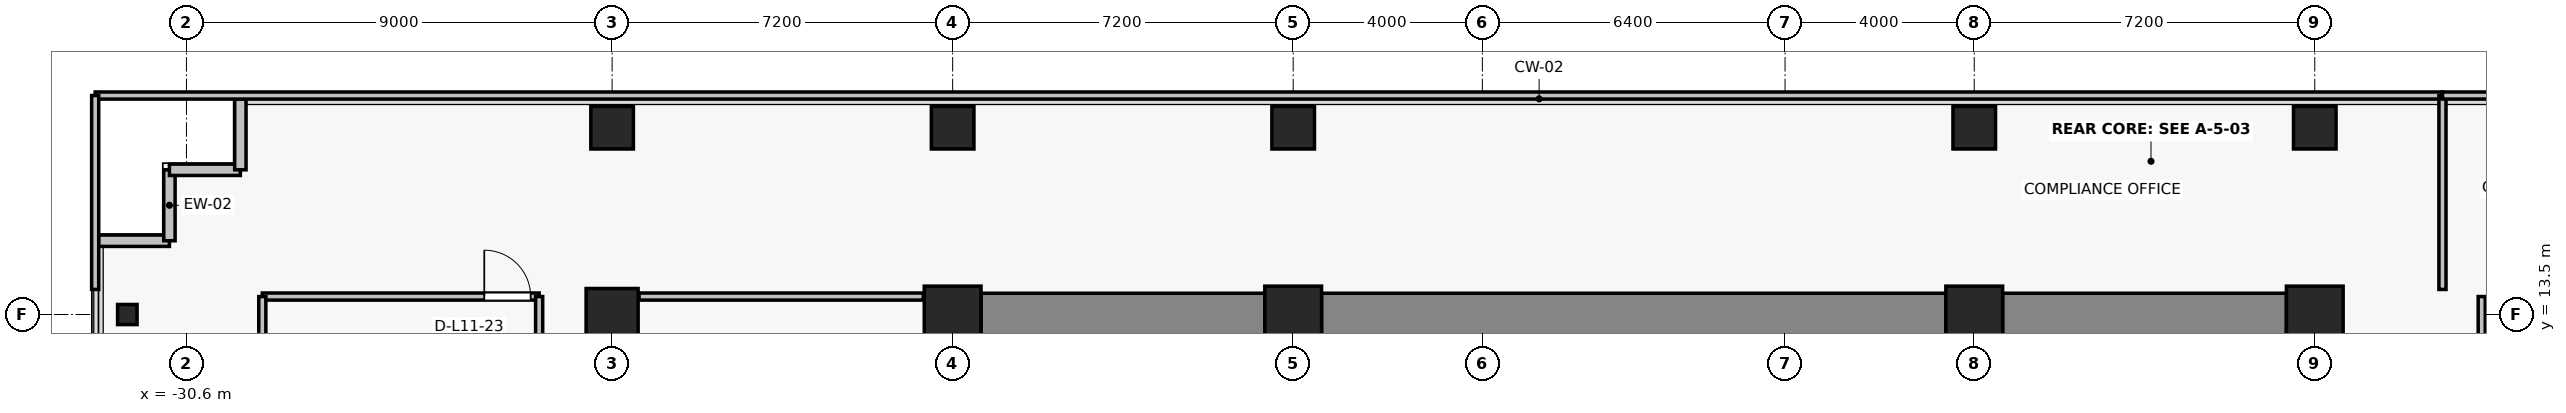
"""IFC4 building model, lengths in metres.
Left out: names, types, materials, properties, quantities, classifications, styles, units other than length and angle.
Written with IfcOpenShell. Run it as: python <this file> out.ifc"""

import sys

from ifc_helpers import new_model, si_unit, direction, frame, frame_2d, origin, origin_2d, place, context, subcontext, project, spatial, rectangle, i_section, extrude, source, transform, mapped, element, fill, save


model = new_model("IFC4")
c1 = context("Model", 3, precision=1e-05, world=origin(), true_north=direction((0.0, 1.0)))
c2 = subcontext(c1, "Body", "Model", "MODEL_VIEW")
j1 = project(units=[si_unit("LENGTHUNIT", "METRE"), si_unit("PLANEANGLEUNIT", "RADIAN")], contexts=[c1])
p1 = place(None, origin())
s1 = spatial("IfcSite", under=j1, at=p1, CompositionType="ELEMENT")
p2 = place(p1, origin())
s2 = spatial("IfcBuilding", under=s1, at=p2, CompositionType="ELEMENT")
p3 = place(p2, frame((0.0, 0.0, 43.9)))
s3 = spatial("IfcBuildingStorey", under=s2, at=p3, CompositionType="ELEMENT", Elevation=43.9)
for number, where, z_axis, x_axis in (
    (1, (-14.4, 13.5, 0.0), (0.0, 0.0, 1.0), (1.0, 0.0, 0.0)),
    (2, (-7.2, 13.5, 0.0), (0.0, 0.0, 1.0), (1.0, 0.0, 0.0)),
    (3, (7.2, 13.5, 0.0), (0.0, 0.0, 1.0), (1.0, 0.0, 0.0)),
    (4, (14.4, 13.5, 0.0), (0.0, 0.0, 1.0), (1.0, 0.0, 0.0)),
):
    element("IfcColumn", number, at=place(p3, frame(where, z_axis=z_axis, x_axis=x_axis)), inside=s3, PredefinedType="COLUMN", context=c2, shape_type="SweptSolid", body=[
        extrude(rectangle(XDim=1.2, YDim=1.2, at=origin_2d()), origin(), (0.0, 0.0, 1.0), 3.3),
    ])
p4 = place(p3, frame((-21.6, 13.5, 0.0), z_axis=(0.0, 0.0, 1.0), x_axis=(1.0, 0.0, 0.0)))
e5 = element("IfcColumn", 5, at=p4, inside=s3, PredefinedType="COLUMN", context=c2, shape_type="SweptSolid", body=[
    extrude(rectangle(XDim=1.1, YDim=1.1, at=origin_2d()), origin(), (0.0, 0.0, 1.0), 3.3),
])
for number, where, z_axis, x_axis in (
    (6, (-14.4, 17.45, 0.0), (0.0, 0.0, 1.0), (1.0, 0.0, 0.0)),
    (7, (-7.2, 17.45, 0.0), (0.0, 0.0, 1.0), (1.0, 0.0, 0.0)),
    (8, (7.2, 17.45, 0.0), (0.0, 0.0, 1.0), (1.0, 0.0, 0.0)),
    (9, (14.4, 17.45, 0.0), (0.0, 0.0, 1.0), (1.0, 0.0, 0.0)),
    (10, (-21.6, 17.45, 0.0), (0.0, 0.0, 1.0), (1.0, 0.0, 0.0)),
):
    element("IfcColumn", number, at=place(p3, frame(where, z_axis=z_axis, x_axis=x_axis)), inside=s3, PredefinedType="COLUMN", context=c2, shape_type="SweptSolid", body=[
        extrude(rectangle(XDim=0.9, YDim=0.9, at=origin_2d()), origin(), (0.0, 0.0, 1.0), 3.3),
    ])
p5 = place(p3, frame((-31.85, 13.5, 0.0), z_axis=(0.0, 0.0, 1.0), x_axis=(1.0, 0.0, 0.0)))
e11 = element("IfcColumn", 11, at=p5, inside=s3, PredefinedType="COLUMN", context=c2, shape_type="SweptSolid", body=[
    extrude(i_section(OverallWidth=0.412, OverallDepth=0.425, WebThickness=0.026, FlangeThickness=0.039, FilletRadius=0.015, at=origin_2d()), origin(), (0.0, 0.0, 1.0), 3.3),
])
p6 = place(p3, frame((-13.8, 13.5, 0.0), z_axis=(0.0, 0.0, 1.0), x_axis=(1.0, 0.0, 0.0)))
e12 = element("IfcWall", 12, at=p6, inside=s3, PredefinedType="SHEAR", context=c2, shape_type="SweptSolid", body=[
    extrude(rectangle(XDim=6.0, YDim=0.9, at=frame_2d((3.0, 0.0))), origin(), (0.0, 0.0, 1.0), 3.075),
])
p7 = place(p3, frame((-6.6, 13.5, 0.0), z_axis=(0.0, 0.0, 1.0), x_axis=(1.0, 0.0, 0.0)))
e13 = element("IfcWall", 13, at=p7, inside=s3, PredefinedType="SHEAR", context=c2, shape_type="SweptSolid", body=[
    extrude(rectangle(XDim=13.2, YDim=0.9, at=frame_2d((6.6, 0.0))), origin(), (0.0, 0.0, 1.0), 3.075),
])
p8 = place(p3, frame((7.8, 13.5, 0.0), z_axis=(0.0, 0.0, 1.0), x_axis=(1.0, 0.0, 0.0)))
e14 = element("IfcWall", 14, at=p8, inside=s3, PredefinedType="SHEAR", context=c2, shape_type="SweptSolid", body=[
    extrude(rectangle(XDim=6.0, YDim=0.9, at=frame_2d((3.0, 0.0))), origin(), (0.0, 0.0, 1.0), 3.075),
])
for number, where, z_axis, x_axis in (
    (15, (-30.96, 15.06, 0.0), (0.0, 0.0, 1.0), (-1.0, 0.0, 0.0)),
    (16, (-30.96, 16.56, 0.0), (0.0, 0.0, 1.0), (0.0, -1.0, 0.0)),
    (17, (-29.46, 16.56, 0.0), (0.0, 0.0, 1.0), (-1.0, 0.0, 0.0)),
    (18, (-29.46, 18.06, 0.0), (0.0, 0.0, 1.0), (0.0, -1.0, 0.0)),
):
    element("IfcWall", number, at=place(p3, frame(where, z_axis=z_axis, x_axis=x_axis)), inside=s3, PredefinedType="SOLIDWALL", context=c2, shape_type="SweptSolid", body=[
        extrude(rectangle(XDim=1.5, YDim=0.24, at=frame_2d((0.75, 0.0))), origin(), (0.0, 0.0, 1.0), 3.075),
    ])
p9 = place(p3, frame((-28.996, 13.88, 0.0), z_axis=(0.0, 0.0, 1.0), x_axis=(1.0, 0.0, 0.0)))
e19 = element("IfcWall", 19, at=p9, inside=s3, PredefinedType="PARTITIONING", context=c2, shape_type="SweptSolid", body=[
    extrude(rectangle(XDim=5.853, YDim=0.15, at=frame_2d((2.927, 0.0))), origin(), (0.0, 0.0, 1.0), 3.075),
])
p10 = place(p9, frame((4.693, 0.0, 0.0)))
e20 = element("IfcOpeningElement", 20, at=p10, cuts=e19, PredefinedType="OPENING", context=c2, shape_type="SweptSolid", body=[
    extrude(rectangle(XDim=0.98, YDim=2.15, at=frame_2d((0.49, 1.075))), frame((0.0, 0.085, 0.0), z_axis=(0.0, -1.0, 0.0), x_axis=(1.0, 0.0, 0.0)), (0.0, 0.0, 1.0), 0.17),
])
for number, where, z_axis, x_axis in (
    (21, (-28.996, -1.77, 0.0), (0.0, 0.0, 1.0), (0.0, 1.0, 0.0)),
    (22, (-23.143, 13.88, 0.0), (0.0, 0.0, 1.0), (0.0, -1.0, 0.0)),
):
    element("IfcWall", number, at=place(p3, frame(where, z_axis=z_axis, x_axis=x_axis)), inside=s3, PredefinedType="PARTITIONING", context=c2, shape_type="SweptSolid", body=[
        extrude(rectangle(XDim=15.65, YDim=0.15, at=frame_2d((7.825, 0.0))), origin(), (0.0, 0.0, 1.0), 2.465),
    ])
p11 = place(p3, frame((-21.03, 13.88, 0.0), z_axis=(0.0, 0.0, 1.0), x_axis=(1.0, 0.0, 0.0)))
e23 = element("IfcWall", 23, at=p11, inside=s3, PredefinedType="PARTITIONING", context=c2, shape_type="SweptSolid", body=[
    extrude(rectangle(XDim=6.01, YDim=0.15, at=frame_2d((3.005, 0.0))), origin(), (0.0, 0.0, 1.0), 3.075),
])
p12 = place(p3, frame((17.93, 8.075, 0.0), z_axis=(0.0, 0.0, 1.0), x_axis=(0.0, 1.0, 0.0)))
e24 = element("IfcWall", 24, at=p12, inside=s3, PredefinedType="PARTITIONING", context=c2, shape_type="SweptSolid", body=[
    extrude(rectangle(XDim=5.805, YDim=0.15, at=frame_2d((2.902, 0.0))), origin(), (0.0, 0.0, 1.0), 2.465),
])
p13 = place(p12, frame((2.413, 0.0, 0.0)))
e25 = element("IfcOpeningElement", 25, at=p13, cuts=e24, PredefinedType="OPENING", context=c2, shape_type="SweptSolid", body=[
    extrude(rectangle(XDim=0.98, YDim=2.15, at=frame_2d((0.49, 1.075))), frame((0.0, 0.085, 0.0), z_axis=(0.0, -1.0, 0.0), x_axis=(1.0, 0.0, 0.0)), (0.0, 0.0, 1.0), 0.17),
])
p14 = place(p3, frame((-32.53, 18.13, 0.0), z_axis=(0.0, 0.0, 1.0), x_axis=(1.0, 0.0, 0.0)))
e26 = element("IfcWall", 26, at=p14, inside=s3, PredefinedType="PARTITIONING", context=c2, shape_type="SweptSolid", body=[
    extrude(rectangle(XDim=49.63, YDim=0.15, at=frame_2d((24.815, 0.0))), origin(), (0.0, 0.0, 1.0), 3.075),
])
p15 = place(p3, frame((-32.53, 14.03, 0.0), z_axis=(0.0, 0.0, 1.0), x_axis=(0.0, 1.0, 0.0)))
e27 = element("IfcWall", 27, at=p15, inside=s3, PredefinedType="PARTITIONING", context=c2, shape_type="SweptSolid", body=[
    extrude(rectangle(XDim=4.1, YDim=0.15, at=frame_2d((2.05, 0.0))), origin(), (0.0, 0.0, 1.0), 3.075),
])
p16 = place(p3, frame((17.1, 18.13, 0.0), z_axis=(0.0, 0.0, 1.0), x_axis=(0.0, -1.0, 0.0)))
e28 = element("IfcWall", 28, at=p16, inside=s3, PredefinedType="PARTITIONING", context=c2, shape_type="SweptSolid", body=[
    extrude(rectangle(XDim=4.1, YDim=0.15, at=frame_2d((2.05, 0.0))), origin(), (0.0, 0.0, 1.0), 2.465),
])
p17 = place(p3, frame((17.1, 18.13, 0.0), z_axis=(0.0, 0.0, 1.0), x_axis=(1.0, 0.0, 0.0)))
e29 = element("IfcWall", 29, at=p17, inside=s3, PredefinedType="PARTITIONING", context=c2, shape_type="SweptSolid", body=[
    extrude(rectangle(XDim=11.43, YDim=0.15, at=frame_2d((5.715, 0.0))), origin(), (0.0, 0.0, 1.0), 3.075),
])
m1 = source(origin(), c2, "Body", "SweptSolid", [
    extrude(rectangle(XDim=0.98, YDim=2.15, at=frame_2d((0.49, 1.075))), frame((0.0, 0.025, 0.0), z_axis=(0.0, -1.0, 0.0), x_axis=(1.0, 0.0, 0.0)), (0.0, 0.0, 1.0), 0.05),
])
p18 = place(p10, origin())
e30 = element("IfcDoor", 30, at=p18, inside=s3, OperationType="SINGLE_SWING_LEFT", PredefinedType="DOOR", context=c2, shape_type="MappedRepresentation", body=[
    mapped(m1, transform((0.0, 0.0, 0.0), x_axis=(1.0, 0.0, 0.0), y_axis=(0.0, 1.0, 0.0), z_axis=(0.0, 0.0, 1.0), scale=1.0)),
])
fill(e20, e30)
save(model, sys.argv[1])
